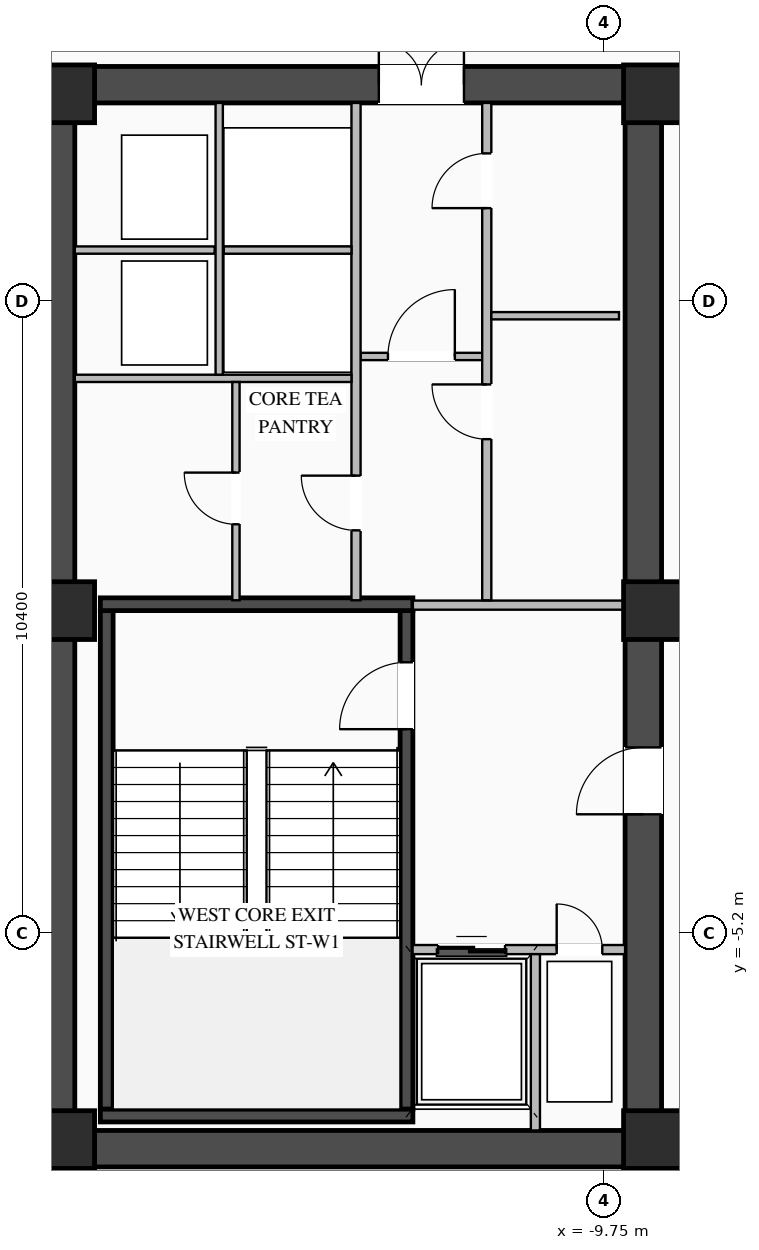
"""IFC4 building model, lengths in metres.
Left out: names, types, materials, properties, quantities, classifications, styles, units other than length and angle.
Written with IfcOpenShell. Run it as: python <this file> out.ifc"""

import sys

from ifc_helpers import new_model, si_unit, direction, frame, frame_2d, origin, origin_2d, place, context, subcontext, project, spatial, rectangle, extrude, element, fill, save


model = new_model("IFC4")
c1 = context("Model", 3, precision=1e-05, world=origin(), true_north=direction((0.0, 1.0)))
c2 = subcontext(c1, "Body", "Model", "MODEL_VIEW")
j1 = project(units=[si_unit("LENGTHUNIT", "METRE"), si_unit("PLANEANGLEUNIT", "RADIAN")], contexts=[c1])
p1 = place(None, origin())
s1 = spatial("IfcSite", under=j1, at=p1, CompositionType="ELEMENT")
p2 = place(p1, origin())
s2 = spatial("IfcBuilding", under=s1, at=p2, CompositionType="ELEMENT")
p3 = place(p2, frame((0.0, 0.0, 156.2)))
s3 = spatial("IfcBuildingStorey", under=s2, at=p3, CompositionType="ELEMENT", Elevation=156.2)
p4 = place(p3, frame((-19.05, -8.75, 0.0), z_axis=(0.0, 0.0, 1.0), x_axis=(1.0, 0.0, 0.0)))
e1 = element("IfcWall", 1, at=p4, inside=s3, PredefinedType="SHEAR", context=c2, shape_type="SweptSolid", body=[
    extrude(rectangle(XDim=10.25, YDim=0.6, at=frame_2d((5.125, 0.0))), origin(), (0.0, 0.0, 1.0), 4.02),
])
p5 = place(p3, frame((-19.05, 8.75, 0.0), z_axis=(0.0, 0.0, 1.0), x_axis=(1.0, 0.0, 0.0)))
e2 = element("IfcWall", 2, at=p5, inside=s3, PredefinedType="SHEAR", context=c2, shape_type="SweptSolid", body=[
    extrude(rectangle(XDim=10.25, YDim=0.6, at=frame_2d((5.125, 0.0))), origin(), (0.0, 0.0, 1.0), 4.02),
])
p6 = place(p5, frame((5.6, 0.0, 0.0)))
e3 = element("IfcOpeningElement", 3, at=p6, cuts=e2, PredefinedType="OPENING", context=c2, shape_type="SweptSolid", body=[
    extrude(rectangle(XDim=1.4, YDim=2.05, at=frame_2d((0.7, 1.025))), frame((0.0, 0.31, 0.0), z_axis=(0.0, -1.0, 0.0), x_axis=(1.0, 0.0, 0.0)), (0.0, 0.0, 1.0), 0.62),
])
p7 = place(p3, frame((-18.75, -8.45, 0.0), z_axis=(0.0, 0.0, 1.0), x_axis=(0.0, 1.0, 0.0)))
e4 = element("IfcWall", 4, at=p7, inside=s3, PredefinedType="SHEAR", context=c2, shape_type="SweptSolid", body=[
    extrude(rectangle(XDim=16.9, YDim=0.6, at=frame_2d((8.45, 0.0))), origin(), (0.0, 0.0, 1.0), 4.02),
])
p8 = place(p3, frame((-9.1, -8.45, 0.0), z_axis=(0.0, 0.0, 1.0), x_axis=(0.0, 1.0, 0.0)))
e5 = element("IfcWall", 5, at=p8, inside=s3, PredefinedType="SHEAR", context=c2, shape_type="SweptSolid", body=[
    extrude(rectangle(XDim=16.9, YDim=0.6, at=frame_2d((8.45, 0.0))), origin(), (0.0, 0.0, 1.0), 4.02),
])
p9 = place(p8, frame((5.2, 0.0, 0.0)))
e6 = element("IfcOpeningElement", 6, at=p9, cuts=e5, PredefinedType="OPENING", context=c2, shape_type="SweptSolid", body=[
    extrude(rectangle(XDim=1.1, YDim=2.08, at=frame_2d((0.55, 1.04))), frame((0.0, 0.31, 0.0), z_axis=(0.0, -1.0, 0.0), x_axis=(1.0, 0.0, 0.0)), (0.0, 0.0, 1.0), 0.62),
])
p10 = place(p3, frame((-12.995, -8.1, 0.0), z_axis=(0.0, 0.0, 1.0), x_axis=(0.0, 1.0, 0.0)))
e7 = element("IfcWall", 7, at=p10, inside=s3, PredefinedType="SHEAR", context=c2, shape_type="SweptSolid", body=[
    extrude(rectangle(XDim=8.2, YDim=0.21, at=frame_2d((4.1, 0.0))), origin(), (0.0, 0.0, 1.0), 4.02),
])
p11 = place(p10, frame((6.25, 0.0, 0.0)))
e8 = element("IfcOpeningElement", 8, at=p11, cuts=e7, PredefinedType="OPENING", context=c2, shape_type="SweptSolid", body=[
    extrude(rectangle(XDim=1.1, YDim=2.15, at=frame_2d((0.55, 1.075))), frame((0.0, 0.115, 0.0), z_axis=(0.0, -1.0, 0.0), x_axis=(1.0, 0.0, 0.0)), (0.0, 0.0, 1.0), 0.23),
])
p12 = place(p3, frame((-17.925, -8.1, 0.0), z_axis=(0.0, 0.0, 1.0), x_axis=(0.0, 1.0, 0.0)))
e9 = element("IfcWall", 9, at=p12, inside=s3, PredefinedType="SHEAR", context=c2, shape_type="SweptSolid", body=[
    extrude(rectangle(XDim=8.2, YDim=0.21, at=frame_2d((4.1, 0.0))), origin(), (0.0, 0.0, 1.0), 4.02),
])
for number, where, z_axis, x_axis in (
    (10, (-18.03, -8.205, 0.0), (0.0, 0.0, 1.0), (1.0, 0.0, 0.0)),
    (11, (-12.89, 0.205, 0.0), (0.0, 0.0, 1.0), (-1.0, 0.0, 0.0)),
):
    element("IfcWall", number, at=place(p3, frame(where, z_axis=z_axis, x_axis=x_axis)), inside=s3, PredefinedType="SHEAR", context=c2, shape_type="SweptSolid", body=[
        extrude(rectangle(XDim=5.14, YDim=0.21, at=frame_2d((2.57, 0.0))), origin(), (0.0, 0.0, 1.0), 4.02),
    ])
for number, where, z_axis, x_axis in (
    (12, (-8.95, -8.6, 0.0), (0.0, 0.0, 1.0), (1.0, 0.0, 0.0)),
    (13, (-8.95, 0.1, 0.0), (0.0, 0.0, 1.0), (1.0, 0.0, 0.0)),
    (14, (-8.95, 8.6, 0.0), (0.0, 0.0, 1.0), (1.0, 0.0, 0.0)),
    (15, (-18.6, -8.6, 0.0), (0.0, 0.0, 1.0), (1.0, 0.0, 0.0)),
    (16, (-18.6, 0.1, 0.0), (0.0, 0.0, 1.0), (1.0, 0.0, 0.0)),
    (17, (-18.6, 8.6, 0.0), (0.0, 0.0, 1.0), (1.0, 0.0, 0.0)),
):
    element("IfcColumn", number, at=place(p3, frame(where, z_axis=z_axis, x_axis=x_axis)), inside=s3, PredefinedType="COLUMN", context=c2, shape_type="SweptSolid", body=[
        extrude(rectangle(XDim=0.95, YDim=0.95, at=origin_2d()), origin(), (0.0, 0.0, 1.0), 4.2),
    ])
p13 = place(p3, frame((-12.895, -5.475, 0.0), z_axis=(0.0, 0.0, 1.0), x_axis=(1.0, 0.0, 0.0)))
e18 = element("IfcWall", 18, at=p13, inside=s3, PredefinedType="STANDARD", context=c2, shape_type="SweptSolid", body=[
    extrude(rectangle(XDim=3.495, YDim=0.15, at=frame_2d((1.748, 0.0))), origin(), (0.0, 0.0, 1.0), 4.0),
])
p14 = place(p13, frame((0.42, 0.0, 0.0)))
e19 = element("IfcOpeningElement", 19, at=p14, cuts=e18, PredefinedType="OPENING", context=c2, shape_type="SweptSolid", body=[
    extrude(rectangle(XDim=1.1, YDim=2.15, at=frame_2d((0.55, 1.075))), frame((0.0, 0.085, 0.0), z_axis=(0.0, -1.0, 0.0), x_axis=(1.0, 0.0, 0.0)), (0.0, 0.0, 1.0), 0.17),
])
p15 = place(p13, frame((2.37, 0.0, 0.0)))
e20 = element("IfcOpeningElement", 20, at=p15, cuts=e18, PredefinedType="OPENING", context=c2, shape_type="SweptSolid", body=[
    extrude(rectangle(XDim=0.75, YDim=2.05, at=frame_2d((0.375, 1.025))), frame((0.0, 0.085, 0.0), z_axis=(0.0, -1.0, 0.0), x_axis=(1.0, 0.0, 0.0)), (0.0, 0.0, 1.0), 0.17),
])
p16 = place(p3, frame((-10.875, -8.45, 0.0), z_axis=(0.0, 0.0, 1.0), x_axis=(0.0, 1.0, 0.0)))
e21 = element("IfcWall", 21, at=p16, inside=s3, PredefinedType="STANDARD", context=c2, shape_type="SweptSolid", body=[
    extrude(rectangle(XDim=2.9, YDim=0.15, at=frame_2d((1.45, 0.0))), origin(), (0.0, 0.0, 1.0), 4.0),
])
p17 = place(p3, frame((-12.89, 0.19, 0.0), z_axis=(0.0, 0.0, 1.0), x_axis=(1.0, 0.0, 0.0)))
e22 = element("IfcWall", 22, at=p17, inside=s3, PredefinedType="STANDARD", context=c2, shape_type="SweptSolid", body=[
    extrude(rectangle(XDim=3.49, YDim=0.15, at=frame_2d((1.745, 0.0))), origin(), (0.0, 0.0, 1.0), 3.395),
])
p18 = place(p3, frame((-13.75, 4.28, 0.0), z_axis=(0.0, 0.0, 1.0), x_axis=(1.0, 0.0, 0.0)))
e23 = element("IfcWall", 23, at=p18, inside=s3, PredefinedType="STANDARD", context=c2, shape_type="SweptSolid", body=[
    extrude(rectangle(XDim=2.0, YDim=0.12, at=frame_2d((1.0, 0.0))), origin(), (0.0, 0.0, 1.0), 4.0),
])
p19 = place(p18, frame((0.45, 0.0, 0.0)))
e24 = element("IfcOpeningElement", 24, at=p19, cuts=e23, PredefinedType="OPENING", context=c2, shape_type="SweptSolid", body=[
    extrude(rectangle(XDim=1.1, YDim=2.1, at=frame_2d((0.55, 1.05))), frame((0.0, 0.07, 0.0), z_axis=(0.0, -1.0, 0.0), x_axis=(1.0, 0.0, 0.0)), (0.0, 0.0, 1.0), 0.14),
])
p20 = place(p3, frame((-11.675, 0.27, 0.0), z_axis=(0.0, 0.0, 1.0), x_axis=(0.0, 1.0, 0.0)))
e25 = element("IfcWall", 25, at=p20, inside=s3, PredefinedType="STANDARD", context=c2, shape_type="SweptSolid", body=[
    extrude(rectangle(XDim=8.18, YDim=0.15, at=frame_2d((4.09, 0.0))), origin(), (0.0, 0.0, 1.0), 4.0),
])
p21 = place(p20, frame((2.65, 0.0, 0.0)))
e26 = element("IfcOpeningElement", 26, at=p21, cuts=e25, PredefinedType="OPENING", context=c2, shape_type="SweptSolid", body=[
    extrude(rectangle(XDim=0.9, YDim=2.05, at=frame_2d((0.45, 1.025))), frame((0.0, 0.085, 0.0), z_axis=(0.0, -1.0, 0.0), x_axis=(1.0, 0.0, 0.0)), (0.0, 0.0, 1.0), 0.17),
])
p22 = place(p20, frame((6.45, 0.0, 0.0)))
e27 = element("IfcOpeningElement", 27, at=p22, cuts=e25, PredefinedType="OPENING", context=c2, shape_type="SweptSolid", body=[
    extrude(rectangle(XDim=0.9, YDim=2.05, at=frame_2d((0.45, 1.025))), frame((0.0, 0.085, 0.0), z_axis=(0.0, -1.0, 0.0), x_axis=(1.0, 0.0, 0.0)), (0.0, 0.0, 1.0), 0.17),
])
p23 = place(p3, frame((-11.6, 4.95, 0.0), z_axis=(0.0, 0.0, 1.0), x_axis=(1.0, 0.0, 0.0)))
e28 = element("IfcWall", 28, at=p23, inside=s3, PredefinedType="STANDARD", context=c2, shape_type="SweptSolid", body=[
    extrude(rectangle(XDim=2.1, YDim=0.12, at=frame_2d((1.05, 0.0))), origin(), (0.0, 0.0, 1.0), 4.0),
])
p24 = place(p3, frame((-13.825, 0.27, 0.0), z_axis=(0.0, 0.0, 1.0), x_axis=(0.0, 1.0, 0.0)))
e29 = element("IfcWall", 29, at=p24, inside=s3, PredefinedType="STANDARD", context=c2, shape_type="SweptSolid", body=[
    extrude(rectangle(XDim=8.18, YDim=0.15, at=frame_2d((4.09, 0.0))), origin(), (0.0, 0.0, 1.0), 4.0),
])
p25 = place(p24, frame((1.15, 0.0, 0.0)))
e30 = element("IfcOpeningElement", 30, at=p25, cuts=e29, PredefinedType="OPENING", context=c2, shape_type="SweptSolid", body=[
    extrude(rectangle(XDim=0.9, YDim=2.05, at=frame_2d((0.45, 1.025))), frame((0.0, 0.085, 0.0), z_axis=(0.0, -1.0, 0.0), x_axis=(1.0, 0.0, 0.0)), (0.0, 0.0, 1.0), 0.17),
])
p26 = place(p3, frame((-18.45, 3.92, 0.0), z_axis=(0.0, 0.0, 1.0), x_axis=(1.0, 0.0, 0.0)))
e31 = element("IfcWall", 31, at=p26, inside=s3, PredefinedType="STANDARD", context=c2, shape_type="SweptSolid", body=[
    extrude(rectangle(XDim=4.55, YDim=0.12, at=frame_2d((2.275, 0.0))), origin(), (0.0, 0.0, 1.0), 4.0),
])
p27 = place(p3, frame((-18.45, 6.03, 0.0), z_axis=(0.0, 0.0, 1.0), x_axis=(1.0, 0.0, 0.0)))
e32 = element("IfcWall", 32, at=p27, inside=s3, PredefinedType="STANDARD", context=c2, shape_type="SweptSolid", body=[
    extrude(rectangle(XDim=2.3, YDim=0.12, at=frame_2d((1.15, 0.0))), origin(), (0.0, 0.0, 1.0), 4.0),
])
p28 = place(p3, frame((-16.075, 3.98, 0.0), z_axis=(0.0, 0.0, 1.0), x_axis=(0.0, 1.0, 0.0)))
e33 = element("IfcWall", 33, at=p28, inside=s3, PredefinedType="STANDARD", context=c2, shape_type="SweptSolid", body=[
    extrude(rectangle(XDim=4.47, YDim=0.12, at=frame_2d((2.235, 0.0))), origin(), (0.0, 0.0, 1.0), 4.0),
])
p29 = place(p3, frame((-16.0, 6.03, 0.0), z_axis=(0.0, 0.0, 1.0), x_axis=(1.0, 0.0, 0.0)))
e34 = element("IfcWall", 34, at=p29, inside=s3, PredefinedType="STANDARD", context=c2, shape_type="SweptSolid", body=[
    extrude(rectangle(XDim=2.1, YDim=0.12, at=frame_2d((1.05, 0.0))), origin(), (0.0, 0.0, 1.0), 4.0),
])
p30 = place(p3, frame((-15.8, 0.27, 0.0), z_axis=(0.0, 0.0, 1.0), x_axis=(0.0, 1.0, 0.0)))
e35 = element("IfcWall", 35, at=p30, inside=s3, PredefinedType="STANDARD", context=c2, shape_type="SweptSolid", body=[
    extrude(rectangle(XDim=3.59, YDim=0.12, at=frame_2d((1.795, 0.0))), origin(), (0.0, 0.0, 1.0), 4.0),
])
p31 = place(p30, frame((1.25, 0.0, 0.0)))
e36 = element("IfcOpeningElement", 36, at=p31, cuts=e35, PredefinedType="OPENING", context=c2, shape_type="SweptSolid", body=[
    extrude(rectangle(XDim=0.85, YDim=2.05, at=frame_2d((0.425, 1.025))), frame((0.0, 0.07, 0.0), z_axis=(0.0, -1.0, 0.0), x_axis=(1.0, 0.0, 0.0)), (0.0, 0.0, 1.0), 0.14),
])
p32 = place(p11, origin())
e37 = element("IfcDoor", 37, at=p32, inside=s3, OperationType="SINGLE_SWING_LEFT", PredefinedType="DOOR", context=c2, shape_type="SweptSolid", body=[
    extrude(rectangle(XDim=1.1, YDim=2.15, at=frame_2d((0.55, 1.075))), frame((0.0, 0.025, 0.0), z_axis=(0.0, -1.0, 0.0), x_axis=(1.0, 0.0, 0.0)), (0.0, 0.0, 1.0), 0.05),
])
fill(e8, e37)
p33 = place(p14, origin())
e38 = element("IfcDoor", 38, at=p33, inside=s3, OperationType="DOUBLE_DOOR_SLIDING", PredefinedType="DOOR", context=c2, shape_type="SweptSolid", body=[
    extrude(rectangle(XDim=1.1, YDim=2.15, at=frame_2d((0.55, 1.075))), frame((0.0, 0.025, 0.0), z_axis=(0.0, -1.0, 0.0), x_axis=(1.0, 0.0, 0.0)), (0.0, 0.0, 1.0), 0.05),
])
fill(e19, e38)
p34 = place(p15, origin())
e39 = element("IfcDoor", 39, at=p34, inside=s3, OperationType="SINGLE_SWING_LEFT", PredefinedType="DOOR", context=c2, shape_type="SweptSolid", body=[
    extrude(rectangle(XDim=0.75, YDim=2.05, at=frame_2d((0.375, 1.025))), frame((0.0, 0.025, 0.0), z_axis=(0.0, -1.0, 0.0), x_axis=(1.0, 0.0, 0.0)), (0.0, 0.0, 1.0), 0.05),
])
fill(e20, e39)
p35 = place(p9, origin())
e40 = element("IfcDoor", 40, at=p35, inside=s3, OperationType="SINGLE_SWING_LEFT", PredefinedType="DOOR", context=c2, shape_type="SweptSolid", body=[
    extrude(rectangle(XDim=1.1, YDim=2.08, at=frame_2d((0.55, 1.04))), frame((0.0, 0.255, 0.0), z_axis=(0.0, -1.0, 0.0), x_axis=(1.0, 0.0, 0.0)), (0.0, 0.0, 1.0), 0.05),
])
fill(e6, e40)
p36 = place(p19, origin())
e41 = element("IfcDoor", 41, at=p36, inside=s3, OperationType="SINGLE_SWING_RIGHT", PredefinedType="DOOR", context=c2, shape_type="SweptSolid", body=[
    extrude(rectangle(XDim=1.1, YDim=2.1, at=frame_2d((0.55, 1.05))), frame((0.0, 0.025, 0.0), z_axis=(0.0, -1.0, 0.0), x_axis=(1.0, 0.0, 0.0)), (0.0, 0.0, 1.0), 0.05),
])
fill(e24, e41)
p37 = place(p6, origin())
e42 = element("IfcDoor", 42, at=p37, inside=s3, OperationType="DOUBLE_DOOR_SINGLE_SWING", PredefinedType="DOOR", context=c2, shape_type="SweptSolid", body=[
    extrude(rectangle(XDim=1.4, YDim=2.05, at=frame_2d((0.7, 1.025))), frame((0.0, 0.245, 0.0), z_axis=(0.0, -1.0, 0.0), x_axis=(1.0, 0.0, 0.0)), (0.0, 0.0, 1.0), 0.05),
])
fill(e3, e42)
p38 = place(p21, origin())
e43 = element("IfcDoor", 43, at=p38, inside=s3, OperationType="SINGLE_SWING_RIGHT", PredefinedType="DOOR", context=c2, shape_type="SweptSolid", body=[
    extrude(rectangle(XDim=0.9, YDim=2.05, at=frame_2d((0.45, 1.025))), frame((0.0, 0.025, 0.0), z_axis=(0.0, -1.0, 0.0), x_axis=(1.0, 0.0, 0.0)), (0.0, 0.0, 1.0), 0.05),
])
fill(e26, e43)
p39 = place(p22, origin())
e44 = element("IfcDoor", 44, at=p39, inside=s3, OperationType="SINGLE_SWING_LEFT", PredefinedType="DOOR", context=c2, shape_type="SweptSolid", body=[
    extrude(rectangle(XDim=0.9, YDim=2.05, at=frame_2d((0.45, 1.025))), frame((0.0, 0.025, 0.0), z_axis=(0.0, -1.0, 0.0), x_axis=(1.0, 0.0, 0.0)), (0.0, 0.0, 1.0), 0.05),
])
fill(e27, e44)
p40 = place(p25, origin())
e45 = element("IfcDoor", 45, at=p40, inside=s3, OperationType="SINGLE_SWING_RIGHT", PredefinedType="DOOR", context=c2, shape_type="SweptSolid", body=[
    extrude(rectangle(XDim=0.9, YDim=2.05, at=frame_2d((0.45, 1.025))), frame((0.0, 0.025, 0.0), z_axis=(0.0, -1.0, 0.0), x_axis=(1.0, 0.0, 0.0)), (0.0, 0.0, 1.0), 0.05),
])
fill(e30, e45)
p41 = place(p31, origin())
e46 = element("IfcDoor", 46, at=p41, inside=s3, OperationType="SINGLE_SWING_RIGHT", PredefinedType="DOOR", context=c2, shape_type="SweptSolid", body=[
    extrude(rectangle(XDim=0.85, YDim=2.05, at=frame_2d((0.425, 1.025))), frame((0.0, 0.025, 0.0), z_axis=(0.0, -1.0, 0.0), x_axis=(1.0, 0.0, 0.0)), (0.0, 0.0, 1.0), 0.05),
])
fill(e36, e46)
save(model, sys.argv[1])
